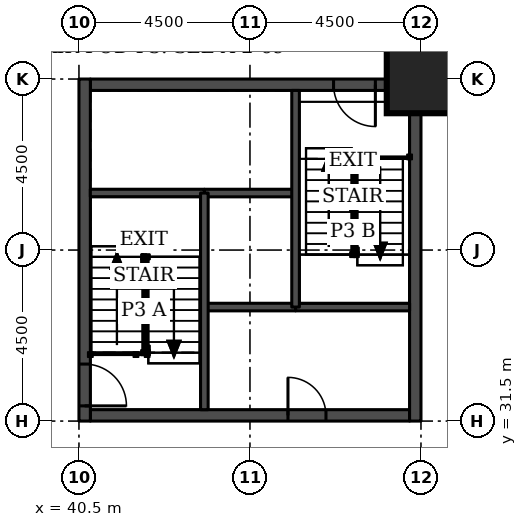
"""IFC4 building model, lengths in metres.
Left out: names, types, materials, properties, quantities, classifications, styles, units other than length and angle.
Written with IfcOpenShell. Run it as: python <this file> out.ifc"""

import sys

from ifc_helpers import new_model, si_unit, direction, frame, frame_2d, origin, origin_2d, place, context, subcontext, project, spatial, rectangle, extrude, element, fill, save


model = new_model("IFC4")
c1 = context("Model", 3, precision=1e-05, world=origin(), true_north=direction((0.0, 1.0)))
c2 = subcontext(c1, "Body", "Model", "MODEL_VIEW")
j1 = project(units=[si_unit("LENGTHUNIT", "METRE"), si_unit("PLANEANGLEUNIT", "RADIAN")], contexts=[c1])
p1 = place(None, origin())
s1 = spatial("IfcSite", under=j1, at=p1, CompositionType="ELEMENT")
p2 = place(p1, origin())
s2 = spatial("IfcBuilding", under=s1, at=p2, CompositionType="ELEMENT")
p3 = place(p2, frame((0.0, 0.0, 8.0)))
s3 = spatial("IfcBuildingStorey", under=s2, at=p3, CompositionType="ELEMENT", Elevation=8.0)
p4 = place(p3, frame((49.5, 40.5, 0.0), z_axis=(0.0, 0.0, 1.0), x_axis=(1.0, 0.0, 0.0)))
e1 = element("IfcColumn", 1, at=p4, inside=s3, PredefinedType="COLUMN", context=c2, shape_type="SweptSolid", body=[
    extrude(rectangle(XDim=1.8, YDim=1.8, at=origin_2d()), origin(), (0.0, 0.0, 1.0), 5.5),
])
p5 = place(p3, frame((40.8, 31.65, 0.0), z_axis=(0.0, 0.0, 1.0), x_axis=(1.0, 0.0, 0.0)))
e2 = element("IfcWall", 2, at=p5, inside=s3, PredefinedType="SHEAR", context=c2, shape_type="SweptSolid", body=[
    extrude(rectangle(XDim=8.4, YDim=0.3, at=frame_2d((4.2, 0.0))), origin(), (0.0, 0.0, 1.0), 5.5),
])
p6 = place(p5, frame((5.2, 0.0, 0.0)))
e3 = element("IfcOpeningElement", 3, at=p6, cuts=e2, PredefinedType="OPENING", context=c2, shape_type="SweptSolid", body=[
    extrude(rectangle(XDim=1.0, YDim=2.1, at=frame_2d((0.5, 1.05))), frame((0.0, 0.16, 0.0), z_axis=(0.0, -1.0, 0.0), x_axis=(1.0, 0.0, 0.0)), (0.0, 0.0, 1.0), 0.32),
])
p7 = place(p3, frame((40.8, 40.35, 0.0), z_axis=(0.0, 0.0, 1.0), x_axis=(1.0, 0.0, 0.0)))
e4 = element("IfcWall", 4, at=p7, inside=s3, PredefinedType="SHEAR", context=c2, shape_type="SweptSolid", body=[
    extrude(rectangle(XDim=8.4, YDim=0.3, at=frame_2d((4.2, 0.0))), origin(), (0.0, 0.0, 1.0), 5.5),
])
p8 = place(p7, frame((6.4, 0.0, 0.0)))
e5 = element("IfcOpeningElement", 5, at=p8, cuts=e4, PredefinedType="OPENING", context=c2, shape_type="SweptSolid", body=[
    extrude(rectangle(XDim=1.1, YDim=2.1, at=frame_2d((0.55, 1.05))), frame((0.0, 0.16, 0.0), z_axis=(0.0, -1.0, 0.0), x_axis=(1.0, 0.0, 0.0)), (0.0, 0.0, 1.0), 0.32),
])
p9 = place(p3, frame((40.65, 31.5, 0.0), z_axis=(0.0, 0.0, 1.0), x_axis=(0.0, 1.0, 0.0)))
e6 = element("IfcWall", 6, at=p9, inside=s3, PredefinedType="SHEAR", context=c2, shape_type="SweptSolid", body=[
    extrude(rectangle(XDim=9.0, YDim=0.3, at=frame_2d((4.5, 0.0))), origin(), (0.0, 0.0, 1.0), 5.5),
])
p10 = place(p9, frame((0.4, 0.0, 0.0)))
e7 = element("IfcOpeningElement", 7, at=p10, cuts=e6, PredefinedType="OPENING", context=c2, shape_type="SweptSolid", body=[
    extrude(rectangle(XDim=1.1, YDim=2.1, at=frame_2d((0.55, 1.05))), frame((0.0, 0.16, 0.0), z_axis=(0.0, -1.0, 0.0), x_axis=(1.0, 0.0, 0.0)), (0.0, 0.0, 1.0), 0.32),
])
p11 = place(p3, frame((49.35, 31.5, 0.0), z_axis=(0.0, 0.0, 1.0), x_axis=(0.0, 1.0, 0.0)))
e8 = element("IfcWall", 8, at=p11, inside=s3, PredefinedType="SHEAR", context=c2, shape_type="SweptSolid", body=[
    extrude(rectangle(XDim=9.0, YDim=0.3, at=frame_2d((4.5, 0.0))), origin(), (0.0, 0.0, 1.0), 5.5),
])
p12 = place(p3, frame((43.8, 34.5, 0.0), z_axis=(0.0, 0.0, 1.0), x_axis=(1.0, 0.0, 0.0)))
e9 = element("IfcWall", 9, at=p12, inside=s3, PredefinedType="SOLIDWALL", context=c2, shape_type="SweptSolid", body=[
    extrude(rectangle(XDim=2.4, YDim=0.2, at=frame_2d((1.2, 0.0))), origin(), (0.0, 0.0, 1.0), 5.15),
])
p13 = place(p3, frame((46.2, 34.5, 0.0), z_axis=(0.0, 0.0, 1.0), x_axis=(1.0, 0.0, 0.0)))
e10 = element("IfcWall", 10, at=p13, inside=s3, PredefinedType="SOLIDWALL", context=c2, shape_type="SweptSolid", body=[
    extrude(rectangle(XDim=3.0, YDim=0.2, at=frame_2d((1.5, 0.0))), origin(), (0.0, 0.0, 1.0), 5.15),
])
p14 = place(p3, frame((43.8, 37.5, 0.0), z_axis=(0.0, 0.0, 1.0), x_axis=(1.0, 0.0, 0.0)))
e11 = element("IfcWall", 11, at=p14, inside=s3, PredefinedType="SOLIDWALL", context=c2, shape_type="SweptSolid", body=[
    extrude(rectangle(XDim=2.4, YDim=0.2, at=frame_2d((1.2, 0.0))), origin(), (0.0, 0.0, 1.0), 5.5),
])
p15 = place(p3, frame((40.8, 37.5, 0.0), z_axis=(0.0, 0.0, 1.0), x_axis=(1.0, 0.0, 0.0)))
e12 = element("IfcWall", 12, at=p15, inside=s3, PredefinedType="SOLIDWALL", context=c2, shape_type="SweptSolid", body=[
    extrude(rectangle(XDim=3.0, YDim=0.2, at=frame_2d((1.5, 0.0))), origin(), (0.0, 0.0, 1.0), 5.15),
])
for number, where, z_axis, x_axis in (
    (13, (43.8, 31.8, 0.0), (0.0, 0.0, 1.0), (0.0, 1.0, 0.0)),
    (14, (46.2, 34.5, 0.0), (0.0, 0.0, 1.0), (0.0, 1.0, 0.0)),
):
    element("IfcWall", number, at=place(p3, frame(where, z_axis=z_axis, x_axis=x_axis)), inside=s3, PredefinedType="SOLIDWALL", context=c2, shape_type="SweptSolid", body=[
        extrude(rectangle(XDim=5.7, YDim=0.2, at=frame_2d((2.85, 0.0))), origin(), (0.0, 0.0, 1.0), 5.15),
    ])
p16 = place(p10, frame((1.1, 0.0, 0.0), z_axis=(0.0, 0.0, 1.0), x_axis=(-1.0, 0.0, 0.0)))
e15 = element("IfcDoor", 15, at=p16, inside=s3, OperationType="SINGLE_SWING_RIGHT", PredefinedType="DOOR", context=c2, shape_type="SweptSolid", body=[
    extrude(rectangle(XDim=1.1, YDim=2.1, at=frame_2d((0.55, 1.05))), frame((0.0, 0.025, 0.0), z_axis=(0.0, -1.0, 0.0), x_axis=(1.0, 0.0, 0.0)), (0.0, 0.0, 1.0), 0.05),
])
fill(e7, e15)
p17 = place(p8, frame((1.1, 0.0, 0.0), z_axis=(0.0, 0.0, 1.0), x_axis=(-1.0, 0.0, 0.0)))
e16 = element("IfcDoor", 16, at=p17, inside=s3, OperationType="SINGLE_SWING_LEFT", PredefinedType="DOOR", context=c2, shape_type="SweptSolid", body=[
    extrude(rectangle(XDim=1.1, YDim=2.1, at=frame_2d((0.55, 1.05))), frame((0.0, 0.025, 0.0), z_axis=(0.0, -1.0, 0.0), x_axis=(1.0, 0.0, 0.0)), (0.0, 0.0, 1.0), 0.05),
])
fill(e5, e16)
p18 = place(p6, origin())
e17 = element("IfcDoor", 17, at=p18, inside=s3, OperationType="SINGLE_SWING_LEFT", PredefinedType="DOOR", context=c2, shape_type="SweptSolid", body=[
    extrude(rectangle(XDim=1.0, YDim=2.1, at=frame_2d((0.5, 1.05))), frame((0.0, 0.025, 0.0), z_axis=(0.0, -1.0, 0.0), x_axis=(1.0, 0.0, 0.0)), (0.0, 0.0, 1.0), 0.05),
])
fill(e3, e17)
save(model, sys.argv[1])
